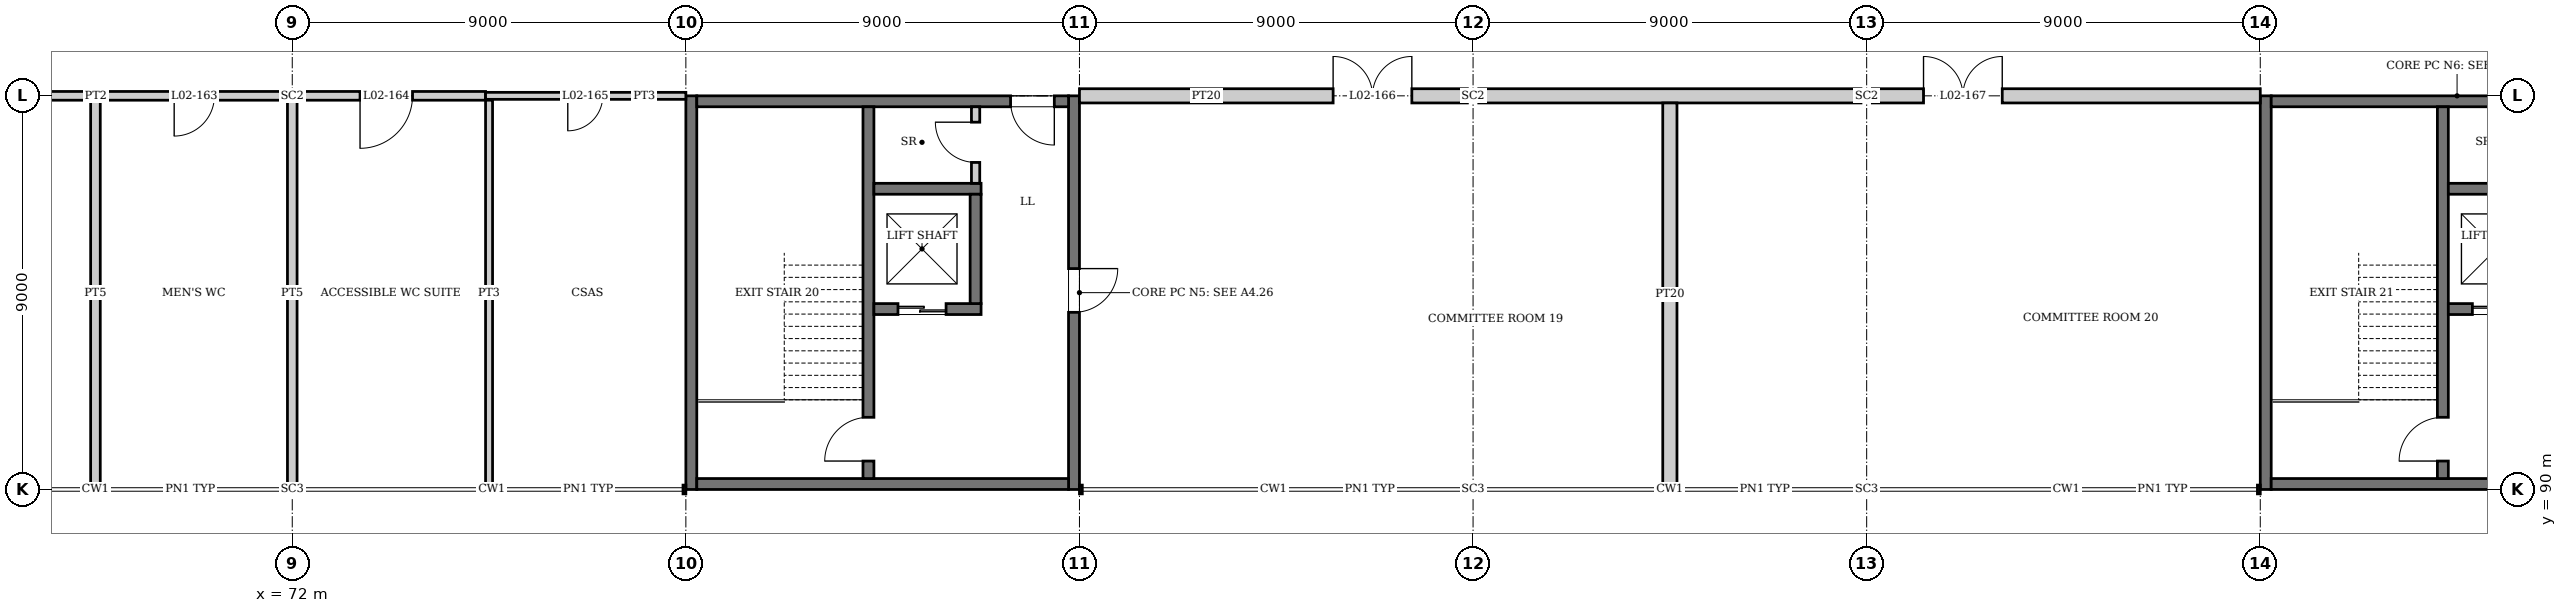
"""IFC4 building model, lengths in metres.
Left out: names, types, materials, properties, quantities, classifications, styles, units other than length and angle.
Written with IfcOpenShell. Run it as: python <this file> out.ifc"""

import sys

from ifc_helpers import new_model, si_unit, direction, frame, frame_2d, origin, origin_2d, place, context, subcontext, project, spatial, rectangle, i_section, extrude, element, fill, save


model = new_model("IFC4")
c1 = context("Model", 3, precision=1e-05, world=origin(), true_north=direction((0.0, 1.0)))
c2 = subcontext(c1, "Body", "Model", "MODEL_VIEW")
j1 = project(units=[si_unit("LENGTHUNIT", "METRE"), si_unit("PLANEANGLEUNIT", "RADIAN")], contexts=[c1])
p1 = place(None, origin())
s1 = spatial("IfcSite", under=j1, at=p1, CompositionType="ELEMENT")
p2 = place(p1, origin())
s2 = spatial("IfcBuilding", under=s1, at=p2, CompositionType="ELEMENT")
p3 = place(p2, frame((0.0, 0.0, 10.5)))
s3 = spatial("IfcBuildingStorey", under=s2, at=p3, CompositionType="ELEMENT", Elevation=10.5)
p4 = place(p3, frame((72.0, 90.0, 0.0), z_axis=(0.0, 0.0, 1.0), x_axis=(0.0, 1.0, 0.0)))
e1 = element("IfcColumn", 1, at=p4, inside=s3, PredefinedType="COLUMN", context=c2, shape_type="SweptSolid", body=[
    extrude(i_section(OverallWidth=0.254, OverallDepth=0.254, WebThickness=0.009, FlangeThickness=0.014, at=origin_2d()), origin(), (0.0, 0.0, 1.0), 4.5),
])
p5 = place(p3, frame((72.0, 99.0, 0.0), z_axis=(0.0, 0.0, 1.0), x_axis=(0.0, 1.0, 0.0)))
e2 = element("IfcColumn", 2, at=p5, inside=s3, PredefinedType="COLUMN", context=c2, shape_type="SweptSolid", body=[
    extrude(i_section(OverallWidth=0.256, OverallDepth=0.26, WebThickness=0.01, FlangeThickness=0.017, at=origin_2d()), origin(), (0.0, 0.0, 1.0), 4.5),
])
p6 = place(p3, frame((99.0, 90.0, 0.0), z_axis=(0.0, 0.0, 1.0), x_axis=(0.0, 1.0, 0.0)))
e3 = element("IfcColumn", 3, at=p6, inside=s3, PredefinedType="COLUMN", context=c2, shape_type="SweptSolid", body=[
    extrude(i_section(OverallWidth=0.254, OverallDepth=0.254, WebThickness=0.009, FlangeThickness=0.014, at=origin_2d()), origin(), (0.0, 0.0, 1.0), 4.5),
])
p7 = place(p3, frame((99.0, 99.0, 0.0), z_axis=(0.0, 0.0, 1.0), x_axis=(0.0, 1.0, 0.0)))
e4 = element("IfcColumn", 4, at=p7, inside=s3, PredefinedType="COLUMN", context=c2, shape_type="SweptSolid", body=[
    extrude(i_section(OverallWidth=0.256, OverallDepth=0.26, WebThickness=0.01, FlangeThickness=0.017, at=origin_2d()), origin(), (0.0, 0.0, 1.0), 4.5),
])
p8 = place(p3, frame((108.0, 90.0, 0.0), z_axis=(0.0, 0.0, 1.0), x_axis=(0.0, 1.0, 0.0)))
e5 = element("IfcColumn", 5, at=p8, inside=s3, PredefinedType="COLUMN", context=c2, shape_type="SweptSolid", body=[
    extrude(i_section(OverallWidth=0.254, OverallDepth=0.254, WebThickness=0.009, FlangeThickness=0.014, at=origin_2d()), origin(), (0.0, 0.0, 1.0), 4.5),
])
p9 = place(p3, frame((108.0, 99.0, 0.0), z_axis=(0.0, 0.0, 1.0), x_axis=(0.0, 1.0, 0.0)))
e6 = element("IfcColumn", 6, at=p9, inside=s3, PredefinedType="COLUMN", context=c2, shape_type="SweptSolid", body=[
    extrude(i_section(OverallWidth=0.256, OverallDepth=0.26, WebThickness=0.01, FlangeThickness=0.017, at=origin_2d()), origin(), (0.0, 0.0, 1.0), 4.5),
])
p10 = place(p3, frame((81.125, 90.0, 0.0), z_axis=(0.0, 0.0, 1.0), x_axis=(0.0, 1.0, 0.0)))
e7 = element("IfcWall", 7, at=p10, inside=s3, PredefinedType="SHEAR", context=c2, shape_type="SweptSolid", body=[
    extrude(rectangle(XDim=9.0, YDim=0.25, at=frame_2d((4.5, 0.0))), origin(), (0.0, 0.0, 1.0), 4.35),
])
p11 = place(p3, frame((89.875, 90.0, 0.0), z_axis=(0.0, 0.0, 1.0), x_axis=(0.0, 1.0, 0.0)))
e8 = element("IfcWall", 8, at=p11, inside=s3, PredefinedType="SHEAR", context=c2, shape_type="SweptSolid", body=[
    extrude(rectangle(XDim=9.0, YDim=0.25, at=frame_2d((4.5, 0.0))), origin(), (0.0, 0.0, 1.0), 4.35),
])
p12 = place(p11, frame((4.05, 0.0, 0.0)))
e9 = element("IfcOpeningElement", 9, at=p12, cuts=e8, PredefinedType="OPENING", context=c2, shape_type="SweptSolid", body=[
    extrude(rectangle(XDim=1.0, YDim=2.1, at=frame_2d((0.5, 1.05))), frame((0.0, 0.135, 0.0), z_axis=(0.0, -1.0, 0.0), x_axis=(1.0, 0.0, 0.0)), (0.0, 0.0, 1.0), 0.27),
])
p13 = place(p3, frame((81.25, 90.125, 0.0), z_axis=(0.0, 0.0, 1.0), x_axis=(1.0, 0.0, 0.0)))
e10 = element("IfcWall", 10, at=p13, inside=s3, PredefinedType="SHEAR", context=c2, shape_type="SweptSolid", body=[
    extrude(rectangle(XDim=8.5, YDim=0.25, at=frame_2d((4.25, 0.0))), origin(), (0.0, 0.0, 1.0), 4.35),
])
p14 = place(p3, frame((81.25, 98.875, 0.0), z_axis=(0.0, 0.0, 1.0), x_axis=(1.0, 0.0, 0.0)))
e11 = element("IfcWall", 11, at=p14, inside=s3, PredefinedType="SHEAR", context=c2, shape_type="SweptSolid", body=[
    extrude(rectangle(XDim=8.5, YDim=0.25, at=frame_2d((4.25, 0.0))), origin(), (0.0, 0.0, 1.0), 4.35),
])
p15 = place(p14, frame((7.175, 0.0, 0.0)))
e12 = element("IfcOpeningElement", 12, at=p15, cuts=e11, PredefinedType="OPENING", context=c2, shape_type="SweptSolid", body=[
    extrude(rectangle(XDim=1.0, YDim=2.1, at=frame_2d((0.5, 1.05))), frame((0.0, 0.135, 0.0), z_axis=(0.0, -1.0, 0.0), x_axis=(1.0, 0.0, 0.0)), (0.0, 0.0, 1.0), 0.27),
])
p16 = place(p3, frame((117.125, 90.0, 0.0), z_axis=(0.0, 0.0, 1.0), x_axis=(0.0, 1.0, 0.0)))
e13 = element("IfcWall", 13, at=p16, inside=s3, PredefinedType="SHEAR", context=c2, shape_type="SweptSolid", body=[
    extrude(rectangle(XDim=9.0, YDim=0.25, at=frame_2d((4.5, 0.0))), origin(), (0.0, 0.0, 1.0), 4.35),
])
p17 = place(p3, frame((117.25, 90.125, 0.0), z_axis=(0.0, 0.0, 1.0), x_axis=(1.0, 0.0, 0.0)))
e14 = element("IfcWall", 14, at=p17, inside=s3, PredefinedType="SHEAR", context=c2, shape_type="SweptSolid", body=[
    extrude(rectangle(XDim=8.5, YDim=0.25, at=frame_2d((4.25, 0.0))), origin(), (0.0, 0.0, 1.0), 4.35),
])
p18 = place(p3, frame((117.25, 98.875, 0.0), z_axis=(0.0, 0.0, 1.0), x_axis=(1.0, 0.0, 0.0)))
e15 = element("IfcWall", 15, at=p18, inside=s3, PredefinedType="SHEAR", context=c2, shape_type="SweptSolid", body=[
    extrude(rectangle(XDim=8.5, YDim=0.25, at=frame_2d((4.25, 0.0))), origin(), (0.0, 0.0, 1.0), 4.35),
])
p19 = place(p18, frame((7.175, 0.0, 0.0)))
e16 = element("IfcOpeningElement", 16, at=p19, cuts=e15, PredefinedType="OPENING", context=c2, shape_type="SweptSolid", body=[
    extrude(rectangle(XDim=1.0, YDim=2.1, at=frame_2d((0.5, 1.05))), frame((0.0, 0.135, 0.0), z_axis=(0.0, -1.0, 0.0), x_axis=(1.0, 0.0, 0.0)), (0.0, 0.0, 1.0), 0.27),
])
p20 = place(p3, frame((85.175, 90.25, 0.0), z_axis=(0.0, 0.0, 1.0), x_axis=(0.0, 1.0, 0.0)))
e17 = element("IfcWall", 17, at=p20, inside=s3, PredefinedType="SOLIDWALL", context=c2, shape_type="SweptSolid", body=[
    extrude(rectangle(XDim=8.5, YDim=0.25, at=frame_2d((4.25, 0.0))), origin(), (0.0, 0.0, 1.0), 4.35),
])
p21 = place(p20, frame((0.4, 0.0, 0.0)))
e18 = element("IfcOpeningElement", 18, at=p21, cuts=e17, PredefinedType="OPENING", context=c2, shape_type="SweptSolid", body=[
    extrude(rectangle(XDim=1.0, YDim=2.1, at=frame_2d((0.5, 1.05))), frame((0.0, 0.135, 0.0), z_axis=(0.0, -1.0, 0.0), x_axis=(1.0, 0.0, 0.0)), (0.0, 0.0, 1.0), 0.27),
])
p22 = place(p3, frame((85.3, 94.125, 0.0), z_axis=(0.0, 0.0, 1.0), x_axis=(1.0, 0.0, 0.0)))
e19 = element("IfcWall", 19, at=p22, inside=s3, PredefinedType="SOLIDWALL", context=c2, shape_type="SweptSolid", body=[
    extrude(rectangle(XDim=2.45, YDim=0.25, at=frame_2d((1.225, 0.0))), origin(), (0.0, 0.0, 1.0), 4.35),
])
p23 = place(p22, frame((0.55, 0.0, 0.0)))
e20 = element("IfcOpeningElement", 20, at=p23, cuts=e19, PredefinedType="OPENING", context=c2, shape_type="SweptSolid", body=[
    extrude(rectangle(XDim=1.1, YDim=2.1, at=frame_2d((0.55, 1.05))), frame((0.0, 0.135, 0.0), z_axis=(0.0, -1.0, 0.0), x_axis=(1.0, 0.0, 0.0)), (0.0, 0.0, 1.0), 0.27),
])
p24 = place(p3, frame((85.3, 96.875, 0.0), z_axis=(0.0, 0.0, 1.0), x_axis=(1.0, 0.0, 0.0)))
e21 = element("IfcWall", 21, at=p24, inside=s3, PredefinedType="SOLIDWALL", context=c2, shape_type="SweptSolid", body=[
    extrude(rectangle(XDim=2.45, YDim=0.25, at=frame_2d((1.225, 0.0))), origin(), (0.0, 0.0, 1.0), 4.35),
])
p25 = place(p3, frame((87.625, 94.25, 0.0), z_axis=(0.0, 0.0, 1.0), x_axis=(0.0, 1.0, 0.0)))
e22 = element("IfcWall", 22, at=p25, inside=s3, PredefinedType="SOLIDWALL", context=c2, shape_type="SweptSolid", body=[
    extrude(rectangle(XDim=2.5, YDim=0.25, at=frame_2d((1.25, 0.0))), origin(), (0.0, 0.0, 1.0), 4.35),
])
p26 = place(p3, frame((121.175, 90.25, 0.0), z_axis=(0.0, 0.0, 1.0), x_axis=(0.0, 1.0, 0.0)))
e23 = element("IfcWall", 23, at=p26, inside=s3, PredefinedType="SOLIDWALL", context=c2, shape_type="SweptSolid", body=[
    extrude(rectangle(XDim=8.5, YDim=0.25, at=frame_2d((4.25, 0.0))), origin(), (0.0, 0.0, 1.0), 4.35),
])
p27 = place(p26, frame((0.4, 0.0, 0.0)))
e24 = element("IfcOpeningElement", 24, at=p27, cuts=e23, PredefinedType="OPENING", context=c2, shape_type="SweptSolid", body=[
    extrude(rectangle(XDim=1.0, YDim=2.1, at=frame_2d((0.5, 1.05))), frame((0.0, 0.135, 0.0), z_axis=(0.0, -1.0, 0.0), x_axis=(1.0, 0.0, 0.0)), (0.0, 0.0, 1.0), 0.27),
])
p28 = place(p3, frame((121.3, 94.125, 0.0), z_axis=(0.0, 0.0, 1.0), x_axis=(1.0, 0.0, 0.0)))
e25 = element("IfcWall", 25, at=p28, inside=s3, PredefinedType="SOLIDWALL", context=c2, shape_type="SweptSolid", body=[
    extrude(rectangle(XDim=2.45, YDim=0.25, at=frame_2d((1.225, 0.0))), origin(), (0.0, 0.0, 1.0), 4.35),
])
p29 = place(p28, frame((0.55, 0.0, 0.0)))
e26 = element("IfcOpeningElement", 26, at=p29, cuts=e25, PredefinedType="OPENING", context=c2, shape_type="SweptSolid", body=[
    extrude(rectangle(XDim=1.1, YDim=2.1, at=frame_2d((0.55, 1.05))), frame((0.0, 0.135, 0.0), z_axis=(0.0, -1.0, 0.0), x_axis=(1.0, 0.0, 0.0)), (0.0, 0.0, 1.0), 0.27),
])
p30 = place(p3, frame((121.3, 96.875, 0.0), z_axis=(0.0, 0.0, 1.0), x_axis=(1.0, 0.0, 0.0)))
e27 = element("IfcWall", 27, at=p30, inside=s3, PredefinedType="SOLIDWALL", context=c2, shape_type="SweptSolid", body=[
    extrude(rectangle(XDim=2.45, YDim=0.25, at=frame_2d((1.225, 0.0))), origin(), (0.0, 0.0, 1.0), 4.35),
])
p31 = place(p3, frame((63.13, 99.0, 0.0), z_axis=(0.0, 0.0, 1.0), x_axis=(1.0, 0.0, 0.0)))
e28 = element("IfcWall", 28, at=p31, inside=s3, PredefinedType="PARTITIONING", context=c2, shape_type="SweptSolid", body=[
    extrude(rectangle(XDim=8.74, YDim=0.2, at=frame_2d((4.37, 0.0))), origin(), (0.0, 0.0, 1.0), 3.822),
])
p32 = place(p31, frame((1.67, 0.0, 0.0)))
e29 = element("IfcOpeningElement", 29, at=p32, cuts=e28, PredefinedType="OPENING", context=c2, shape_type="SweptSolid", body=[
    extrude(rectangle(XDim=0.92, YDim=2.1, at=frame_2d((0.46, 1.05))), frame((0.0, 0.11, 0.0), z_axis=(0.0, -1.0, 0.0), x_axis=(1.0, 0.0, 0.0)), (0.0, 0.0, 1.0), 0.22),
])
p33 = place(p31, frame((6.17, 0.0, 0.0)))
e30 = element("IfcOpeningElement", 30, at=p33, cuts=e28, PredefinedType="OPENING", context=c2, shape_type="SweptSolid", body=[
    extrude(rectangle(XDim=0.92, YDim=2.1, at=frame_2d((0.46, 1.05))), frame((0.0, 0.11, 0.0), z_axis=(0.0, -1.0, 0.0), x_axis=(1.0, 0.0, 0.0)), (0.0, 0.0, 1.0), 0.22),
])
p34 = place(p3, frame((72.13, 99.0, 0.0), z_axis=(0.0, 0.0, 1.0), x_axis=(1.0, 0.0, 0.0)))
e31 = element("IfcWall", 31, at=p34, inside=s3, PredefinedType="PARTITIONING", context=c2, shape_type="SweptSolid", body=[
    extrude(rectangle(XDim=4.29, YDim=0.2, at=frame_2d((2.145, 0.0))), origin(), (0.0, 0.0, 1.0), 3.822),
])
p35 = place(p34, frame((1.42, 0.0, 0.0)))
e32 = element("IfcOpeningElement", 32, at=p35, cuts=e31, PredefinedType="OPENING", context=c2, shape_type="SweptSolid", body=[
    extrude(rectangle(XDim=1.2, YDim=2.1, at=frame_2d((0.6, 1.05))), frame((0.0, 0.11, 0.0), z_axis=(0.0, -1.0, 0.0), x_axis=(1.0, 0.0, 0.0)), (0.0, 0.0, 1.0), 0.22),
])
p36 = place(p3, frame((76.42, 99.0, 0.0), z_axis=(0.0, 0.0, 1.0), x_axis=(1.0, 0.0, 0.0)))
e33 = element("IfcWall", 33, at=p36, inside=s3, PredefinedType="PARTITIONING", context=c2, shape_type="SweptSolid", body=[
    extrude(rectangle(XDim=4.58, YDim=0.16, at=frame_2d((2.29, 0.0))), origin(), (0.0, 0.0, 1.0), 3.822),
])
p37 = place(p36, frame((1.88, 0.0, 0.0)))
e34 = element("IfcOpeningElement", 34, at=p37, cuts=e33, PredefinedType="OPENING", context=c2, shape_type="SweptSolid", body=[
    extrude(rectangle(XDim=0.8, YDim=2.0, at=frame_2d((0.4, 1.0))), frame((0.0, 0.09, 0.0), z_axis=(0.0, -1.0, 0.0), x_axis=(1.0, 0.0, 0.0)), (0.0, 0.0, 1.0), 0.18),
])
p38 = place(p3, frame((90.0, 99.0, 0.0), z_axis=(0.0, 0.0, 1.0), x_axis=(1.0, 0.0, 0.0)))
e35 = element("IfcWall", 35, at=p38, inside=s3, PredefinedType="PARTITIONING", context=c2, shape_type="SweptSolid", body=[
    extrude(rectangle(XDim=8.87, YDim=0.325, at=frame_2d((4.435, 0.0))), origin(), (0.0, 0.0, 1.0), 3.822),
])
p39 = place(p38, frame((5.8, 0.0, 0.0)))
e36 = element("IfcOpeningElement", 36, at=p39, cuts=e35, PredefinedType="OPENING", context=c2, shape_type="SweptSolid", body=[
    extrude(rectangle(XDim=1.8, YDim=2.4, at=frame_2d((0.9, 1.2))), frame((0.0, 0.172, 0.0), z_axis=(0.0, -1.0, 0.0), x_axis=(1.0, 0.0, 0.0)), (0.0, 0.0, 1.0), 0.345),
])
p40 = place(p3, frame((99.13, 99.0, 0.0), z_axis=(0.0, 0.0, 1.0), x_axis=(1.0, 0.0, 0.0)))
e37 = element("IfcWall", 37, at=p40, inside=s3, PredefinedType="PARTITIONING", context=c2, shape_type="SweptSolid", body=[
    extrude(rectangle(XDim=8.74, YDim=0.325, at=frame_2d((4.37, 0.0))), origin(), (0.0, 0.0, 1.0), 3.822),
])
p41 = place(p3, frame((108.13, 99.0, 0.0), z_axis=(0.0, 0.0, 1.0), x_axis=(1.0, 0.0, 0.0)))
e38 = element("IfcWall", 38, at=p41, inside=s3, PredefinedType="PARTITIONING", context=c2, shape_type="SweptSolid", body=[
    extrude(rectangle(XDim=8.87, YDim=0.325, at=frame_2d((4.435, 0.0))), origin(), (0.0, 0.0, 1.0), 3.738),
])
p42 = place(p41, frame((1.17, 0.0, 0.0)))
e39 = element("IfcOpeningElement", 39, at=p42, cuts=e38, PredefinedType="OPENING", context=c2, shape_type="SweptSolid", body=[
    extrude(rectangle(XDim=1.8, YDim=2.4, at=frame_2d((0.9, 1.2))), frame((0.0, 0.172, 0.0), z_axis=(0.0, -1.0, 0.0), x_axis=(1.0, 0.0, 0.0)), (0.0, 0.0, 1.0), 0.345),
])
p43 = place(p3, frame((67.5, 90.1, 0.0), z_axis=(0.0, 0.0, 1.0), x_axis=(0.0, 1.0, 0.0)))
e40 = element("IfcWall", 40, at=p43, inside=s3, PredefinedType="PLUMBINGWALL", context=c2, shape_type="SweptSolid", body=[
    extrude(rectangle(XDim=8.8, YDim=0.22, at=frame_2d((4.4, 0.0))), origin(), (0.0, 0.0, 1.0), 3.822),
])
p44 = place(p3, frame((72.0, 90.127, 0.0), z_axis=(0.0, 0.0, 1.0), x_axis=(0.0, 1.0, 0.0)))
e41 = element("IfcWall", 41, at=p44, inside=s3, PredefinedType="PLUMBINGWALL", context=c2, shape_type="SweptSolid", body=[
    extrude(rectangle(XDim=8.743, YDim=0.22, at=frame_2d((4.372, 0.0))), origin(), (0.0, 0.0, 1.0), 3.998),
])
p45 = place(p3, frame((76.5, 90.1, 0.0), z_axis=(0.0, 0.0, 1.0), x_axis=(0.0, 1.0, 0.0)))
e42 = element("IfcWall", 42, at=p45, inside=s3, PredefinedType="PARTITIONING", context=c2, shape_type="SweptSolid", body=[
    extrude(rectangle(XDim=8.8, YDim=0.16, at=frame_2d((4.4, 0.0))), origin(), (0.0, 0.0, 1.0), 3.822),
])
p46 = place(p3, frame((87.625, 97.0, 0.0), z_axis=(0.0, 0.0, 1.0), x_axis=(0.0, 1.0, 0.0)))
e43 = element("IfcWall", 43, at=p46, inside=s3, PredefinedType="PARTITIONING", context=c2, shape_type="SweptSolid", body=[
    extrude(rectangle(XDim=1.75, YDim=0.19, at=frame_2d((0.875, 0.0))), origin(), (0.0, 0.0, 1.0), 4.35),
])
p47 = place(p46, frame((0.478, 0.0, 0.0)))
e44 = element("IfcOpeningElement", 44, at=p47, cuts=e43, PredefinedType="OPENING", context=c2, shape_type="SweptSolid", body=[
    extrude(rectangle(XDim=0.92, YDim=2.1, at=frame_2d((0.46, 1.05))), frame((0.0, 0.105, 0.0), z_axis=(0.0, -1.0, 0.0), x_axis=(1.0, 0.0, 0.0)), (0.0, 0.0, 1.0), 0.21),
])
p48 = place(p3, frame((103.5, 90.1, 0.0), z_axis=(0.0, 0.0, 1.0), x_axis=(0.0, 1.0, 0.0)))
e45 = element("IfcWall", 45, at=p48, inside=s3, PredefinedType="PARTITIONING", context=c2, shape_type="SweptSolid", body=[
    extrude(rectangle(XDim=8.737, YDim=0.325, at=frame_2d((4.369, 0.0))), origin(), (0.0, 0.0, 1.0), 3.822),
])
p49 = place(p23, origin())
e46 = element("IfcDoor", 46, at=p49, inside=s3, OperationType="DOUBLE_DOOR_SLIDING", PredefinedType="DOOR", context=c2, shape_type="SweptSolid", body=[
    extrude(rectangle(XDim=1.1, YDim=2.1, at=frame_2d((0.55, 1.05))), frame((0.0, 0.025, 0.0), z_axis=(0.0, -1.0, 0.0), x_axis=(1.0, 0.0, 0.0)), (0.0, 0.0, 1.0), 0.05),
])
fill(e20, e46)
p50 = place(p29, origin())
e47 = element("IfcDoor", 47, at=p50, inside=s3, OperationType="DOUBLE_DOOR_SLIDING", PredefinedType="DOOR", context=c2, shape_type="SweptSolid", body=[
    extrude(rectangle(XDim=1.1, YDim=2.1, at=frame_2d((0.55, 1.05))), frame((0.0, 0.025, 0.0), z_axis=(0.0, -1.0, 0.0), x_axis=(1.0, 0.0, 0.0)), (0.0, 0.0, 1.0), 0.05),
])
fill(e26, e47)
p51 = place(p21, origin())
e48 = element("IfcDoor", 48, at=p51, inside=s3, OperationType="SINGLE_SWING_LEFT", PredefinedType="DOOR", context=c2, shape_type="SweptSolid", body=[
    extrude(rectangle(XDim=1.0, YDim=2.1, at=frame_2d((0.5, 1.05))), frame((0.0, 0.025, 0.0), z_axis=(0.0, -1.0, 0.0), x_axis=(1.0, 0.0, 0.0)), (0.0, 0.0, 1.0), 0.05),
])
fill(e18, e48)
p52 = place(p47, origin())
e49 = element("IfcDoor", 49, at=p52, inside=s3, OperationType="SINGLE_SWING_RIGHT", PredefinedType="DOOR", context=c2, shape_type="SweptSolid", body=[
    extrude(rectangle(XDim=0.92, YDim=2.1, at=frame_2d((0.46, 1.05))), frame((0.0, 0.025, 0.0), z_axis=(0.0, -1.0, 0.0), x_axis=(1.0, 0.0, 0.0)), (0.0, 0.0, 1.0), 0.05),
])
fill(e44, e49)
p53 = place(p27, origin())
e50 = element("IfcDoor", 50, at=p53, inside=s3, OperationType="SINGLE_SWING_LEFT", PredefinedType="DOOR", context=c2, shape_type="SweptSolid", body=[
    extrude(rectangle(XDim=1.0, YDim=2.1, at=frame_2d((0.5, 1.05))), frame((0.0, 0.025, 0.0), z_axis=(0.0, -1.0, 0.0), x_axis=(1.0, 0.0, 0.0)), (0.0, 0.0, 1.0), 0.05),
])
fill(e24, e50)
p54 = place(p15, frame((1.0, 0.0, 0.0), z_axis=(0.0, 0.0, 1.0), x_axis=(-1.0, 0.0, 0.0)))
e51 = element("IfcDoor", 51, at=p54, inside=s3, OperationType="SINGLE_SWING_LEFT", PredefinedType="DOOR", context=c2, shape_type="SweptSolid", body=[
    extrude(rectangle(XDim=1.0, YDim=2.1, at=frame_2d((0.5, 1.05))), frame((0.0, 0.025, 0.0), z_axis=(0.0, -1.0, 0.0), x_axis=(1.0, 0.0, 0.0)), (0.0, 0.0, 1.0), 0.05),
])
fill(e12, e51)
p55 = place(p12, frame((1.0, 0.0, 0.0), z_axis=(0.0, 0.0, 1.0), x_axis=(-1.0, 0.0, 0.0)))
e52 = element("IfcDoor", 52, at=p55, inside=s3, OperationType="SINGLE_SWING_LEFT", PredefinedType="DOOR", context=c2, shape_type="SweptSolid", body=[
    extrude(rectangle(XDim=1.0, YDim=2.1, at=frame_2d((0.5, 1.05))), frame((0.0, 0.025, 0.0), z_axis=(0.0, -1.0, 0.0), x_axis=(1.0, 0.0, 0.0)), (0.0, 0.0, 1.0), 0.05),
])
fill(e9, e52)
p56 = place(p33, frame((0.92, 0.0, 0.0), z_axis=(0.0, 0.0, 1.0), x_axis=(-1.0, 0.0, 0.0)))
e53 = element("IfcDoor", 53, at=p56, inside=s3, OperationType="SINGLE_SWING_RIGHT", PredefinedType="DOOR", context=c2, shape_type="SweptSolid", body=[
    extrude(rectangle(XDim=0.92, YDim=2.1, at=frame_2d((0.46, 1.05))), frame((0.0, 0.025, 0.0), z_axis=(0.0, -1.0, 0.0), x_axis=(1.0, 0.0, 0.0)), (0.0, 0.0, 1.0), 0.05),
])
fill(e30, e53)
p57 = place(p35, frame((1.2, 0.0, 0.0), z_axis=(0.0, 0.0, 1.0), x_axis=(-1.0, 0.0, 0.0)))
e54 = element("IfcDoor", 54, at=p57, inside=s3, OperationType="SINGLE_SWING_RIGHT", PredefinedType="DOOR", context=c2, shape_type="SweptSolid", body=[
    extrude(rectangle(XDim=1.2, YDim=2.1, at=frame_2d((0.6, 1.05))), frame((0.0, 0.025, 0.0), z_axis=(0.0, -1.0, 0.0), x_axis=(1.0, 0.0, 0.0)), (0.0, 0.0, 1.0), 0.05),
])
fill(e32, e54)
p58 = place(p37, frame((0.8, 0.0, 0.0), z_axis=(0.0, 0.0, 1.0), x_axis=(-1.0, 0.0, 0.0)))
e55 = element("IfcDoor", 55, at=p58, inside=s3, OperationType="SINGLE_SWING_RIGHT", PredefinedType="DOOR", context=c2, shape_type="SweptSolid", body=[
    extrude(rectangle(XDim=0.8, YDim=2.0, at=frame_2d((0.4, 1.0))), frame((0.0, 0.025, 0.0), z_axis=(0.0, -1.0, 0.0), x_axis=(1.0, 0.0, 0.0)), (0.0, 0.0, 1.0), 0.05),
])
fill(e34, e55)
p59 = place(p39, origin())
e56 = element("IfcDoor", 56, at=p59, inside=s3, OperationType="DOUBLE_DOOR_SINGLE_SWING", PredefinedType="DOOR", context=c2, shape_type="SweptSolid", body=[
    extrude(rectangle(XDim=1.8, YDim=2.4, at=frame_2d((0.9, 1.2))), frame((0.0, 0.025, 0.0), z_axis=(0.0, -1.0, 0.0), x_axis=(1.0, 0.0, 0.0)), (0.0, 0.0, 1.0), 0.05),
])
fill(e36, e56)
p60 = place(p42, origin())
e57 = element("IfcDoor", 57, at=p60, inside=s3, OperationType="DOUBLE_DOOR_SINGLE_SWING", PredefinedType="DOOR", context=c2, shape_type="SweptSolid", body=[
    extrude(rectangle(XDim=1.8, YDim=2.4, at=frame_2d((0.9, 1.2))), frame((0.0, 0.025, 0.0), z_axis=(0.0, -1.0, 0.0), x_axis=(1.0, 0.0, 0.0)), (0.0, 0.0, 1.0), 0.05),
])
fill(e39, e57)
save(model, sys.argv[1])
